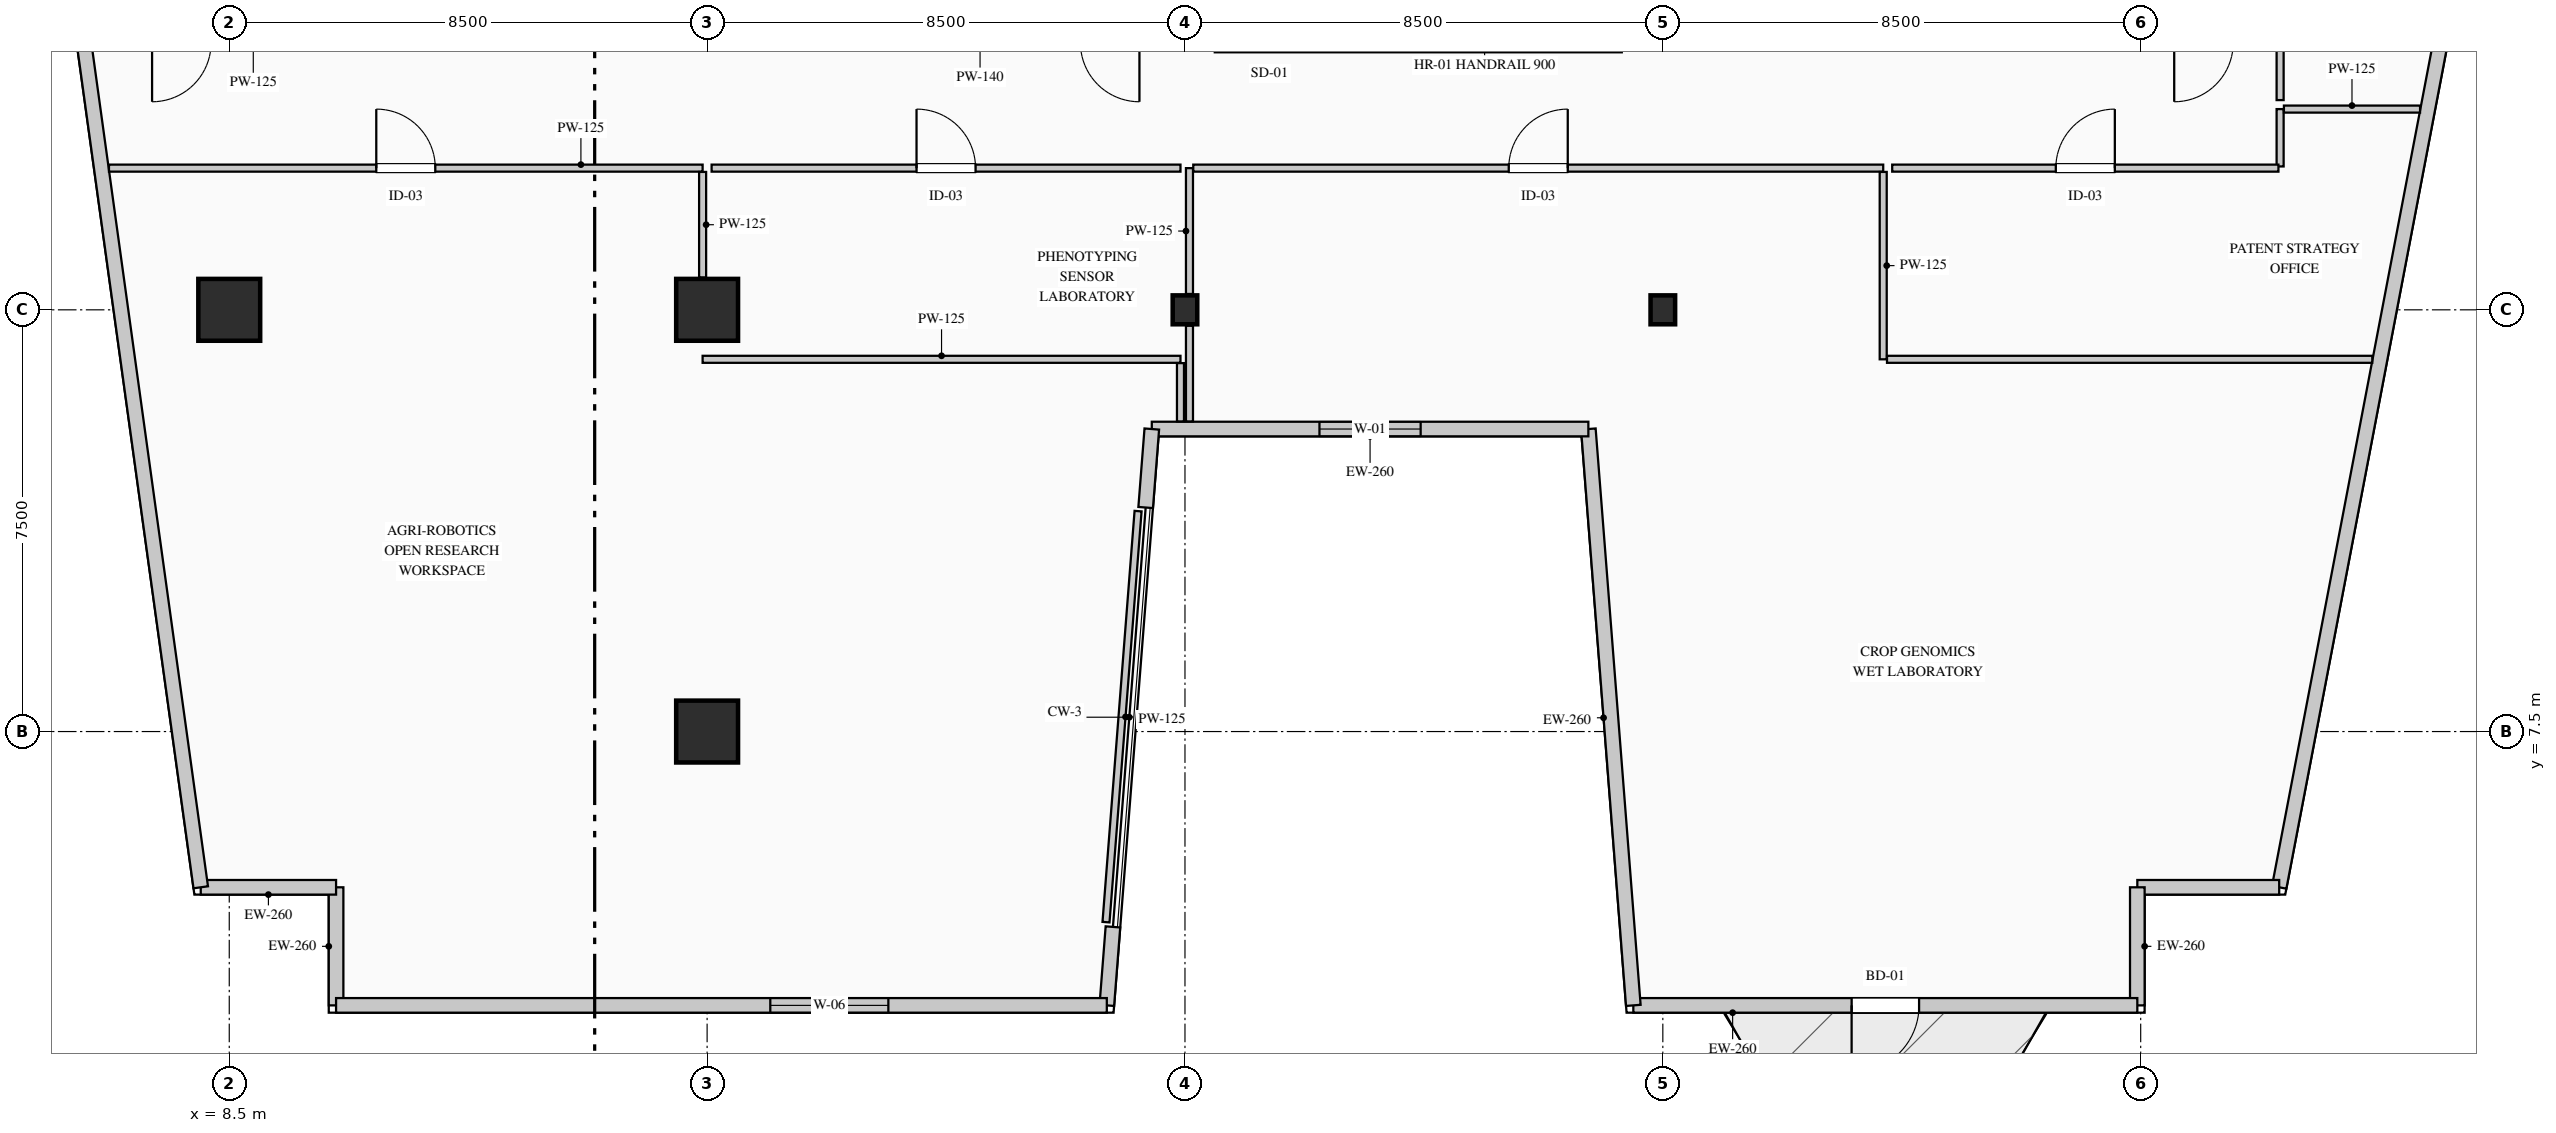
"""IFC4 building model, lengths in metres.
Left out: names, types, materials, properties, quantities, classifications, styles, units other than length and angle.
Written with IfcOpenShell. Run it as: python <this file> out.ifc"""

import sys

from ifc_helpers import new_model, si_unit, direction, frame, frame_2d, origin, origin_2d, place, context, subcontext, project, spatial, rectangle, i_section, extrude, element, fill, save


model = new_model("IFC4")
c1 = context("Model", 3, precision=1e-05, world=origin(), true_north=direction((0.0, 1.0)))
c2 = subcontext(c1, "Body", "Model", "MODEL_VIEW")
j1 = project(units=[si_unit("LENGTHUNIT", "METRE"), si_unit("PLANEANGLEUNIT", "RADIAN")], contexts=[c1])
p1 = place(None, origin())
s1 = spatial("IfcSite", under=j1, at=p1, CompositionType="ELEMENT")
p2 = place(p1, origin())
s2 = spatial("IfcBuilding", under=s1, at=p2, CompositionType="ELEMENT")
p3 = place(p2, frame((0.0, 0.0, 111.4)))
s3 = spatial("IfcBuildingStorey", under=s2, at=p3, CompositionType="ELEMENT", Elevation=111.4)
for number, where, z_axis, x_axis in (
    (1, (8.5, 15.0, 0.0), (0.0, 0.0, 1.0), (1.0, 0.0, 0.0)),
    (2, (17.0, 7.5, 0.0), (0.0, 0.0, 1.0), (1.0, 0.0, 0.0)),
    (3, (17.0, 15.0, 0.0), (0.0, 0.0, 1.0), (1.0, 0.0, 0.0)),
):
    element("IfcColumn", number, at=place(p3, frame(where, z_axis=z_axis, x_axis=x_axis)), inside=s3, PredefinedType="COLUMN", context=c2, shape_type="SweptSolid", body=[
        extrude(rectangle(XDim=1.1, YDim=1.1, at=origin_2d()), origin(), (0.0, 0.0, 1.0), 3.95),
    ])
for number, where, z_axis, x_axis in (
    (4, (25.5, 15.0, 0.0), (0.0, 0.0, 1.0), (1.0, 0.0, 0.0)),
    (5, (34.0, 15.0, 0.0), (0.0, 0.0, 1.0), (1.0, 0.0, 0.0)),
):
    element("IfcColumn", number, at=place(p3, frame(where, z_axis=z_axis, x_axis=x_axis)), inside=s3, PredefinedType="COLUMN", context=c2, shape_type="SweptSolid", body=[
        extrude(i_section(OverallWidth=0.437, OverallDepth=0.514, WebThickness=0.061, FlangeThickness=0.077, FilletRadius=0.015, at=origin_2d()), origin(), (0.0, 0.0, 1.0), 3.95),
    ])
p4 = place(p3, frame((10.4, 2.63, 0.0), z_axis=(0.0, 0.0, 1.0), x_axis=(0.0, 1.0, 0.0)))
e6 = element("IfcWall", 6, at=p4, inside=s3, PredefinedType="STANDARD", context=c2, shape_type="SweptSolid", body=[
    extrude(rectangle(XDim=2.1, YDim=0.26, at=frame_2d((1.05, 0.0))), origin(), (0.0, 0.0, 1.0), 3.69),
])
p5 = place(p3, frame((10.4, 4.73, 0.0), z_axis=(0.0, 0.0, 1.0), x_axis=(-1.0, 0.0, 0.0)))
e7 = element("IfcWall", 7, at=p5, inside=s3, PredefinedType="STANDARD", context=c2, shape_type="SweptSolid", body=[
    extrude(rectangle(XDim=2.407, YDim=0.26, at=frame_2d((1.204, 0.0))), origin(), (0.0, 0.0, 1.0), 3.69),
])
p6 = place(p3, frame((7.993, 4.73, 0.0), z_axis=(0.0, 0.0, 1.0), x_axis=(-0.136989009016, 0.990572567462, 0.0)))
e8 = element("IfcWall", 8, at=p6, inside=s3, PredefinedType="STANDARD", context=c2, shape_type="SweptSolid", body=[
    extrude(rectangle(XDim=36.888, YDim=0.26, at=frame_2d((18.444, 0.0))), origin(), (0.0, 0.0, 1.0), 3.69),
])
p7 = place(p6, frame((19.839, 0.0, 0.9)))
e9 = element("IfcOpeningElement", 9, at=p7, cuts=e8, PredefinedType="OPENING", context=c2, shape_type="SweptSolid", body=[
    extrude(rectangle(XDim=2.1, YDim=2.0, at=frame_2d((1.05, 1.0))), frame((0.0, 0.14, 0.0), z_axis=(0.0, -1.0, 0.0), x_axis=(1.0, 0.0, 0.0)), (0.0, 0.0, 1.0), 0.28),
])
p8 = place(p3, frame((51.942, 41.27, 0.0), z_axis=(0.0, 0.0, 1.0), x_axis=(-0.187592192405, -0.982247000173, 0.0)))
e10 = element("IfcWall", 10, at=p8, inside=s3, PredefinedType="STANDARD", context=c2, shape_type="SweptSolid", body=[
    extrude(rectangle(XDim=37.2, YDim=0.26, at=frame_2d((18.6, 0.0))), origin(), (0.0, 0.0, 1.0), 3.69),
])
p9 = place(p8, frame((12.342, 0.0, 0.9)))
e11 = element("IfcOpeningElement", 11, at=p9, cuts=e10, PredefinedType="OPENING", context=c2, shape_type="SweptSolid", body=[
    extrude(rectangle(XDim=2.1, YDim=2.0, at=frame_2d((1.05, 1.0))), frame((0.0, 0.14, 0.0), z_axis=(0.0, -1.0, 0.0), x_axis=(1.0, 0.0, 0.0)), (0.0, 0.0, 1.0), 0.28),
])
p10 = place(p3, frame((44.963, 4.73, 0.0), z_axis=(0.0, 0.0, 1.0), x_axis=(-1.0, 0.0, 0.0)))
e12 = element("IfcWall", 12, at=p10, inside=s3, PredefinedType="STANDARD", context=c2, shape_type="SweptSolid", body=[
    extrude(rectangle(XDim=2.523, YDim=0.26, at=frame_2d((1.262, 0.0))), origin(), (0.0, 0.0, 1.0), 3.69),
])
p11 = place(p3, frame((42.44, 4.73, 0.0), z_axis=(0.0, 0.0, 1.0), x_axis=(0.0, -1.0, 0.0)))
e13 = element("IfcWall", 13, at=p11, inside=s3, PredefinedType="STANDARD", context=c2, shape_type="SweptSolid", body=[
    extrude(rectangle(XDim=2.1, YDim=0.26, at=frame_2d((1.05, 0.0))), origin(), (0.0, 0.0, 1.0), 3.69),
])
p12 = place(p3, frame((42.44, 2.63, 0.0), z_axis=(0.0, 0.0, 1.0), x_axis=(-1.0, 0.0, 0.0)))
e14 = element("IfcWall", 14, at=p12, inside=s3, PredefinedType="STANDARD", context=c2, shape_type="SweptSolid", body=[
    extrude(rectangle(XDim=8.965, YDim=0.26, at=frame_2d((4.482, 0.0))), origin(), (0.0, 0.0, 1.0), 3.69),
])
p13 = place(p12, frame((3.882, 0.0, 0.0)))
e15 = element("IfcOpeningElement", 15, at=p13, cuts=e14, PredefinedType="OPENING", context=c2, shape_type="SweptSolid", body=[
    extrude(rectangle(XDim=1.2, YDim=2.2, at=frame_2d((0.6, 1.1))), frame((0.0, 0.14, 0.0), z_axis=(0.0, -1.0, 0.0), x_axis=(1.0, 0.0, 0.0)), (0.0, 0.0, 1.0), 0.28),
])
p14 = place(p3, frame((33.475, 2.63, 0.0), z_axis=(0.0, 0.0, 1.0), x_axis=(-0.077793257511, 0.996969512616, 0.0)))
e16 = element("IfcWall", 16, at=p14, inside=s3, PredefinedType="STANDARD", context=c2, shape_type="SweptSolid", body=[
    extrude(rectangle(XDim=10.281, YDim=0.26, at=frame_2d((5.141, 0.0))), origin(), (0.0, 0.0, 1.0), 3.69),
])
p15 = place(p3, frame((32.675, 12.88, 0.0), z_axis=(0.0, 0.0, 1.0), x_axis=(-1.0, 0.0, 0.0)))
e17 = element("IfcWall", 17, at=p15, inside=s3, PredefinedType="STANDARD", context=c2, shape_type="SweptSolid", body=[
    extrude(rectangle(XDim=7.765, YDim=0.26, at=frame_2d((3.883, 0.0))), origin(), (0.0, 0.0, 1.0), 3.69),
])
p16 = place(p15, frame((2.983, 0.0, 0.9)))
e18 = element("IfcOpeningElement", 18, at=p16, cuts=e17, PredefinedType="OPENING", context=c2, shape_type="SweptSolid", body=[
    extrude(rectangle(XDim=1.8, YDim=2.1, at=frame_2d((0.9, 1.05))), frame((0.0, 0.14, 0.0), z_axis=(0.0, -1.0, 0.0), x_axis=(1.0, 0.0, 0.0)), (0.0, 0.0, 1.0), 0.28),
])
for number, where, z_axis, x_axis in (
    (19, (24.91, 12.88, 0.0), (0.0, 0.0, 1.0), (-0.078, -0.997, 0.0)),
    (20, (24.219, 4.026, 0.0), (0.0, 0.0, 1.0), (-0.078, -0.997, 0.0)),
):
    element("IfcWall", number, at=place(p3, frame(where, z_axis=z_axis, x_axis=x_axis)), inside=s3, PredefinedType="STANDARD", context=c2, shape_type="SweptSolid", body=[
        extrude(rectangle(XDim=1.4, YDim=0.26, at=frame_2d((0.7, 0.0))), origin(), (0.0, 0.0, 1.0), 3.69),
    ])
p17 = place(p3, frame((24.11, 2.63, 0.0), z_axis=(0.0, 0.0, 1.0), x_axis=(-1.0, 0.0, 0.0)))
e21 = element("IfcWall", 21, at=p17, inside=s3, PredefinedType="STANDARD", context=c2, shape_type="SweptSolid", body=[
    extrude(rectangle(XDim=13.71, YDim=0.26, at=frame_2d((6.855, 0.0))), origin(), (0.0, 0.0, 1.0), 3.69),
])
p18 = place(p17, frame((3.886, 0.0, 0.9)))
e22 = element("IfcOpeningElement", 22, at=p18, cuts=e21, PredefinedType="OPENING", context=c2, shape_type="SweptSolid", body=[
    extrude(rectangle(XDim=2.1, YDim=2.0, at=frame_2d((1.05, 1.0))), frame((0.0, 0.14, 0.0), z_axis=(0.0, -1.0, 0.0), x_axis=(1.0, 0.0, 0.0)), (0.0, 0.0, 1.0), 0.28),
])
p19 = place(p3, frame((6.36, 17.52, 0.0), z_axis=(0.0, 0.0, 1.0), x_axis=(1.0, 0.0, 0.0)))
e23 = element("IfcWall", 23, at=p19, inside=s3, PredefinedType="PARTITIONING", context=c2, shape_type="SweptSolid", body=[
    extrude(rectangle(XDim=10.56, YDim=0.125, at=frame_2d((5.28, 0.0))), origin(), (0.0, 0.0, 1.0), 3.69),
])
p20 = place(p19, frame((4.755, 0.0, 0.0)))
e24 = element("IfcOpeningElement", 24, at=p20, cuts=e23, PredefinedType="OPENING", context=c2, shape_type="SweptSolid", body=[
    extrude(rectangle(XDim=1.05, YDim=2.15, at=frame_2d((0.525, 1.075))), frame((0.0, 0.073, 0.0), z_axis=(0.0, -1.0, 0.0), x_axis=(1.0, 0.0, 0.0)), (0.0, 0.0, 1.0), 0.145),
])
p21 = place(p3, frame((16.92, 17.452, 0.0), z_axis=(0.0, 0.0, 1.0), x_axis=(0.0, -1.0, 0.0)))
e25 = element("IfcWall", 25, at=p21, inside=s3, PredefinedType="PARTITIONING", context=c2, shape_type="SweptSolid", body=[
    extrude(rectangle(XDim=1.877, YDim=0.125, at=frame_2d((0.939, 0.0))), origin(), (0.0, 0.0, 1.0), 3.69),
])
p22 = place(p3, frame((16.92, 14.12, 0.0), z_axis=(0.0, 0.0, 1.0), x_axis=(1.0, 0.0, 0.0)))
e26 = element("IfcWall", 26, at=p22, inside=s3, PredefinedType="PARTITIONING", context=c2, shape_type="SweptSolid", body=[
    extrude(rectangle(XDim=8.5, YDim=0.125, at=frame_2d((4.25, 0.0))), origin(), (0.0, 0.0, 1.0), 3.69),
])
p23 = place(p3, frame((25.42, 14.052, 0.0), z_axis=(0.0, 0.0, 1.0), x_axis=(0.0, -1.0, 0.0)))
e27 = element("IfcWall", 27, at=p23, inside=s3, PredefinedType="PARTITIONING", context=c2, shape_type="SweptSolid", body=[
    extrude(rectangle(XDim=1.038, YDim=0.125, at=frame_2d((0.519, 0.0))), origin(), (0.0, 0.0, 1.0), 3.69),
])
p24 = place(p3, frame((24.666, 11.42, 0.0), z_axis=(0.0, 0.0, 1.0), x_axis=(-0.077816821526, -0.996967673642, 0.0)))
e28 = element("IfcWall", 28, at=p24, inside=s3, PredefinedType="PARTITIONING", context=c2, shape_type="SweptSolid", body=[
    extrude(rectangle(XDim=7.332, YDim=0.125, at=frame_2d((3.666, 0.0))), origin(), (0.0, 0.0, 1.0), 3.69),
])
p25 = place(p3, frame((25.58, 13.015, 0.0), z_axis=(0.0, 0.0, 1.0), x_axis=(0.0, 1.0, 0.0)))
e29 = element("IfcWall", 29, at=p25, inside=s3, PredefinedType="PARTITIONING", context=c2, shape_type="SweptSolid", body=[
    extrude(rectangle(XDim=1.703, YDim=0.125, at=frame_2d((0.852, 0.0))), origin(), (0.0, 0.0, 1.0), 3.69),
])
p26 = place(p3, frame((25.58, 15.282, 0.0), z_axis=(0.0, 0.0, 1.0), x_axis=(0.0, 1.0, 0.0)))
e30 = element("IfcWall", 30, at=p26, inside=s3, PredefinedType="PARTITIONING", context=c2, shape_type="SweptSolid", body=[
    extrude(rectangle(XDim=2.238, YDim=0.125, at=frame_2d((1.119, 0.0))), origin(), (0.0, 0.0, 1.0), 2.875),
])
p27 = place(p3, frame((25.647, 17.52, 0.0), z_axis=(0.0, 0.0, 1.0), x_axis=(1.0, 0.0, 0.0)))
e31 = element("IfcWall", 31, at=p27, inside=s3, PredefinedType="PARTITIONING", context=c2, shape_type="SweptSolid", body=[
    extrude(rectangle(XDim=12.272, YDim=0.125, at=frame_2d((6.136, 0.0))), origin(), (0.0, 0.0, 1.0), 3.475),
])
p28 = place(p27, frame((5.611, 0.0, 0.0)))
e32 = element("IfcOpeningElement", 32, at=p28, cuts=e31, PredefinedType="OPENING", context=c2, shape_type="SweptSolid", body=[
    extrude(rectangle(XDim=1.05, YDim=2.15, at=frame_2d((0.525, 1.075))), frame((0.0, 0.073, 0.0), z_axis=(0.0, -1.0, 0.0), x_axis=(1.0, 0.0, 0.0)), (0.0, 0.0, 1.0), 0.145),
])
p29 = place(p3, frame((37.92, 17.452, 0.0), z_axis=(0.0, 0.0, 1.0), x_axis=(0.0, -1.0, 0.0)))
e33 = element("IfcWall", 33, at=p29, inside=s3, PredefinedType="PARTITIONING", context=c2, shape_type="SweptSolid", body=[
    extrude(rectangle(XDim=3.332, YDim=0.125, at=frame_2d((1.666, 0.0))), origin(), (0.0, 0.0, 1.0), 3.69),
])
p30 = place(p3, frame((37.988, 14.12, 0.0), z_axis=(0.0, 0.0, 1.0), x_axis=(1.0, 0.0, 0.0)))
e34 = element("IfcWall", 34, at=p30, inside=s3, PredefinedType="PARTITIONING", context=c2, shape_type="SweptSolid", body=[
    extrude(rectangle(XDim=8.632, YDim=0.125, at=frame_2d((4.316, 0.0))), origin(), (0.0, 0.0, 1.0), 3.69),
])
p31 = place(p3, frame((17.08, 17.52, 0.0), z_axis=(0.0, 0.0, 1.0), x_axis=(1.0, 0.0, 0.0)))
e35 = element("IfcWall", 35, at=p31, inside=s3, PredefinedType="PARTITIONING", context=c2, shape_type="SweptSolid", body=[
    extrude(rectangle(XDim=8.34, YDim=0.125, at=frame_2d((4.17, 0.0))), origin(), (0.0, 0.0, 1.0), 3.69),
])
p32 = place(p31, frame((3.645, 0.0, 0.0)))
e36 = element("IfcOpeningElement", 36, at=p32, cuts=e35, PredefinedType="OPENING", context=c2, shape_type="SweptSolid", body=[
    extrude(rectangle(XDim=1.05, YDim=2.15, at=frame_2d((0.525, 1.075))), frame((0.0, 0.073, 0.0), z_axis=(0.0, -1.0, 0.0), x_axis=(1.0, 0.0, 0.0)), (0.0, 0.0, 1.0), 0.145),
])
p33 = place(p3, frame((44.98, 17.55, 0.0), z_axis=(0.0, 0.0, 1.0), x_axis=(0.0, 1.0, 0.0)))
e37 = element("IfcWall", 37, at=p33, inside=s3, PredefinedType="PARTITIONING", context=c2, shape_type="SweptSolid", body=[
    extrude(rectangle(XDim=1.02, YDim=0.125, at=frame_2d((0.51, 0.0))), origin(), (0.0, 0.0, 1.0), 3.69),
])
p34 = place(p3, frame((45.048, 18.57, 0.0), z_axis=(0.0, 0.0, 1.0), x_axis=(1.0, 0.0, 0.0)))
e38 = element("IfcWall", 38, at=p34, inside=s3, PredefinedType="PARTITIONING", context=c2, shape_type="SweptSolid", body=[
    extrude(rectangle(XDim=2.422, YDim=0.125, at=frame_2d((1.211, 0.0))), origin(), (0.0, 0.0, 1.0), 3.69),
])
p35 = place(p3, frame((38.08, 17.52, 0.0), z_axis=(0.0, 0.0, 1.0), x_axis=(1.0, 0.0, 0.0)))
e39 = element("IfcWall", 39, at=p35, inside=s3, PredefinedType="PARTITIONING", context=c2, shape_type="SweptSolid", body=[
    extrude(rectangle(XDim=6.87, YDim=0.125, at=frame_2d((3.435, 0.0))), origin(), (0.0, 0.0, 1.0), 3.69),
])
p36 = place(p35, frame((2.91, 0.0, 0.0)))
e40 = element("IfcOpeningElement", 40, at=p36, cuts=e39, PredefinedType="OPENING", context=c2, shape_type="SweptSolid", body=[
    extrude(rectangle(XDim=1.05, YDim=2.15, at=frame_2d((0.525, 1.075))), frame((0.0, 0.073, 0.0), z_axis=(0.0, -1.0, 0.0), x_axis=(1.0, 0.0, 0.0)), (0.0, 0.0, 1.0), 0.145),
])
p37 = place(p3, frame((44.98, 18.73, 0.0), z_axis=(0.0, 0.0, 1.0), x_axis=(0.0, 1.0, 0.0)))
e41 = element("IfcWall", 41, at=p37, inside=s3, PredefinedType="PARTITIONING", context=c2, shape_type="SweptSolid", body=[
    extrude(rectangle(XDim=1.02, YDim=0.125, at=frame_2d((0.51, 0.0))), origin(), (0.0, 0.0, 1.0), 3.69),
])
p38 = place(p13, origin())
e42 = element("IfcDoor", 42, at=p38, inside=s3, OperationType="SINGLE_SWING_RIGHT", PredefinedType="DOOR", context=c2, shape_type="SweptSolid", body=[
    extrude(rectangle(XDim=1.2, YDim=2.2, at=frame_2d((0.6, 1.1))), frame((0.0, 0.025, 0.0), z_axis=(0.0, -1.0, 0.0), x_axis=(1.0, 0.0, 0.0)), (0.0, 0.0, 1.0), 0.05),
])
fill(e15, e42)
p39 = place(p16, origin())
e43 = element("IfcWindow", 43, at=p39, inside=s3, PartitioningType="SINGLE_PANEL", PredefinedType="WINDOW", context=c2, shape_type="SweptSolid", body=[
    extrude(rectangle(XDim=1.8, YDim=2.1, at=frame_2d((0.9, 1.05))), frame((0.0, 0.03, 0.0), z_axis=(0.0, -1.0, 0.0), x_axis=(1.0, 0.0, 0.0)), (0.0, 0.0, 1.0), 0.06),
])
fill(e18, e43)
p40 = place(p18, origin())
e44 = element("IfcWindow", 44, at=p40, inside=s3, PartitioningType="DOUBLE_PANEL_VERTICAL", PredefinedType="WINDOW", context=c2, shape_type="SweptSolid", body=[
    extrude(rectangle(XDim=2.1, YDim=2.0, at=frame_2d((1.05, 1.0))), frame((0.0, 0.03, 0.0), z_axis=(0.0, -1.0, 0.0), x_axis=(1.0, 0.0, 0.0)), (0.0, 0.0, 1.0), 0.06),
])
fill(e22, e44)
p41 = place(p20, origin())
e45 = element("IfcDoor", 45, at=p41, inside=s3, OperationType="SINGLE_SWING_LEFT", PredefinedType="DOOR", context=c2, shape_type="SweptSolid", body=[
    extrude(rectangle(XDim=1.05, YDim=2.15, at=frame_2d((0.525, 1.075))), frame((0.0, 0.025, 0.0), z_axis=(0.0, -1.0, 0.0), x_axis=(1.0, 0.0, 0.0)), (0.0, 0.0, 1.0), 0.05),
])
fill(e24, e45)
p42 = place(p28, origin())
e46 = element("IfcDoor", 46, at=p42, inside=s3, OperationType="SINGLE_SWING_RIGHT", PredefinedType="DOOR", context=c2, shape_type="SweptSolid", body=[
    extrude(rectangle(XDim=1.05, YDim=2.15, at=frame_2d((0.525, 1.075))), frame((0.0, 0.025, 0.0), z_axis=(0.0, -1.0, 0.0), x_axis=(1.0, 0.0, 0.0)), (0.0, 0.0, 1.0), 0.05),
])
fill(e32, e46)
p43 = place(p32, origin())
e47 = element("IfcDoor", 47, at=p43, inside=s3, OperationType="SINGLE_SWING_LEFT", PredefinedType="DOOR", context=c2, shape_type="SweptSolid", body=[
    extrude(rectangle(XDim=1.05, YDim=2.15, at=frame_2d((0.525, 1.075))), frame((0.0, 0.025, 0.0), z_axis=(0.0, -1.0, 0.0), x_axis=(1.0, 0.0, 0.0)), (0.0, 0.0, 1.0), 0.05),
])
fill(e36, e47)
p44 = place(p36, origin())
e48 = element("IfcDoor", 48, at=p44, inside=s3, OperationType="SINGLE_SWING_RIGHT", PredefinedType="DOOR", context=c2, shape_type="SweptSolid", body=[
    extrude(rectangle(XDim=1.05, YDim=2.15, at=frame_2d((0.525, 1.075))), frame((0.0, 0.025, 0.0), z_axis=(0.0, -1.0, 0.0), x_axis=(1.0, 0.0, 0.0)), (0.0, 0.0, 1.0), 0.05),
])
fill(e40, e48)
save(model, sys.argv[1])
